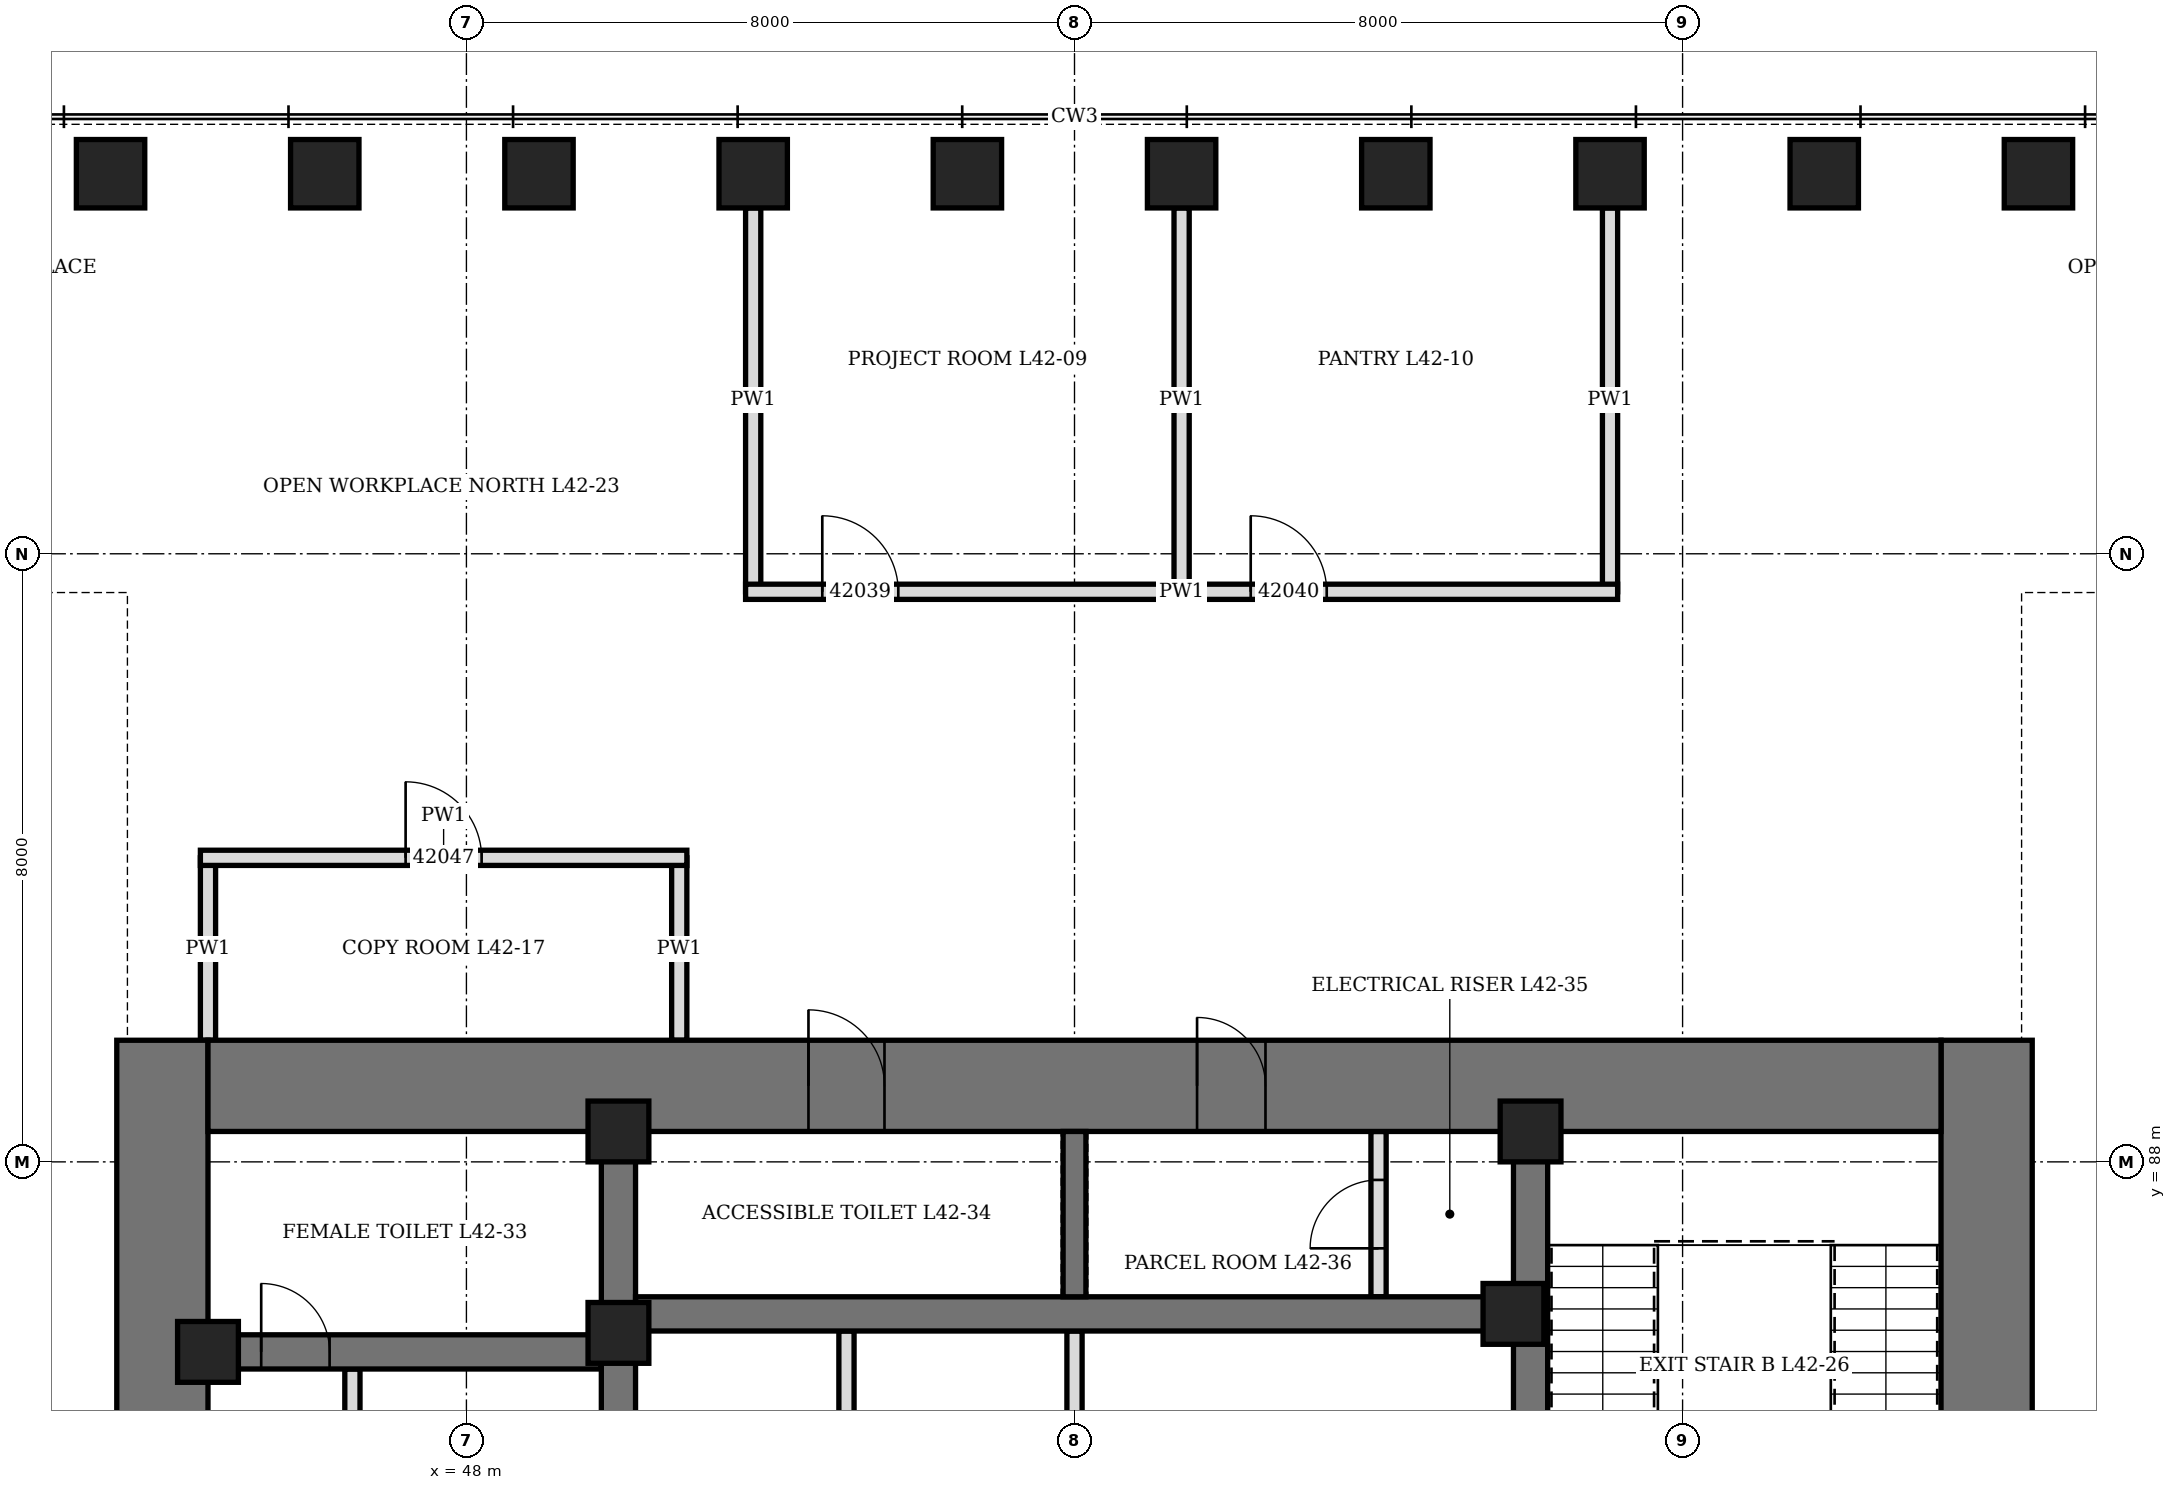
"""IFC4 building model, lengths in metres.
Left out: names, types, materials, properties, quantities, classifications, styles, units other than length and angle.
Written with IfcOpenShell. Run it as: python <this file> out.ifc"""

import sys

from ifc_helpers import new_model, si_unit, direction, frame, frame_2d, origin, origin_2d, place, context, subcontext, project, spatial, rectangle, hollow_rectangle, extrude, element, fill, save


model = new_model("IFC4")
c1 = context("Model", 3, precision=1e-05, world=origin(), true_north=direction((0.0, 1.0)))
c2 = subcontext(c1, "Body", "Model", "MODEL_VIEW")
j1 = project(units=[si_unit("LENGTHUNIT", "METRE"), si_unit("PLANEANGLEUNIT", "RADIAN")], contexts=[c1])
p1 = place(None, origin())
s1 = spatial("IfcSite", under=j1, at=p1, CompositionType="ELEMENT")
p2 = place(p1, origin())
s2 = spatial("IfcBuilding", under=s1, at=p2, CompositionType="ELEMENT")
p3 = place(p2, frame((0.0, 0.0, 189.7)))
s3 = spatial("IfcBuildingStorey", under=s2, at=p3, CompositionType="ELEMENT", Elevation=189.7)
for number, where, z_axis, x_axis in (
    (1, (68.682, 101.0, 0.0), (0.0, 0.0, 1.0), (1.0, 0.0, 0.0)),
    (2, (65.864, 101.0, 0.0), (0.0, 0.0, 1.0), (1.0, 0.0, 0.0)),
    (3, (63.045, 101.0, 0.0), (0.0, 0.0, 1.0), (1.0, 0.0, 0.0)),
    (4, (60.227, 101.0, 0.0), (0.0, 0.0, 1.0), (1.0, 0.0, 0.0)),
    (5, (57.409, 101.0, 0.0), (0.0, 0.0, 1.0), (1.0, 0.0, 0.0)),
    (6, (54.591, 101.0, 0.0), (0.0, 0.0, 1.0), (1.0, 0.0, 0.0)),
    (7, (51.773, 101.0, 0.0), (0.0, 0.0, 1.0), (1.0, 0.0, 0.0)),
    (8, (48.955, 101.0, 0.0), (0.0, 0.0, 1.0), (1.0, 0.0, 0.0)),
    (9, (46.136, 101.0, 0.0), (0.0, 0.0, 1.0), (1.0, 0.0, 0.0)),
    (10, (43.318, 101.0, 0.0), (0.0, 0.0, 1.0), (1.0, 0.0, 0.0)),
):
    element("IfcColumn", number, at=place(p3, frame(where, z_axis=z_axis, x_axis=x_axis)), inside=s3, PredefinedType="COLUMN", context=c2, shape_type="SweptSolid", body=[
        extrude(hollow_rectangle(XDim=0.9, YDim=0.9, WallThickness=0.12, at=origin_2d()), origin(), (0.0, 0.0, 1.0), 4.2),
    ])
p4 = place(p3, frame((44.0, 70.4, 0.0), z_axis=(0.0, 0.0, 1.0), x_axis=(0.0, 1.0, 0.0)))
e11 = element("IfcWall", 11, at=p4, inside=s3, PredefinedType="SHEAR", context=c2, shape_type="SweptSolid", body=[
    extrude(rectangle(XDim=19.2, YDim=1.2, at=frame_2d((9.6, 0.0))), origin(), (0.0, 0.0, 1.0), 4.2),
])
p5 = place(p4, frame((8.6, 0.0, 0.0)))
e12 = element("IfcOpeningElement", 12, at=p5, cuts=e11, PredefinedType="OPENING", context=c2, shape_type="SweptSolid", body=[
    extrude(rectangle(XDim=2.0, YDim=2.4, at=frame_2d((1.0, 1.2))), frame((0.0, 0.61, 0.0), z_axis=(0.0, -1.0, 0.0), x_axis=(1.0, 0.0, 0.0)), (0.0, 0.0, 1.0), 1.22),
])
p6 = place(p3, frame((68.0, 70.4, 0.0), z_axis=(0.0, 0.0, 1.0), x_axis=(0.0, 1.0, 0.0)))
e13 = element("IfcWall", 13, at=p6, inside=s3, PredefinedType="SHEAR", context=c2, shape_type="SweptSolid", body=[
    extrude(rectangle(XDim=19.2, YDim=1.2, at=frame_2d((9.6, 0.0))), origin(), (0.0, 0.0, 1.0), 4.2),
])
p7 = place(p6, frame((8.6, 0.0, 0.0)))
e14 = element("IfcOpeningElement", 14, at=p7, cuts=e13, PredefinedType="OPENING", context=c2, shape_type="SweptSolid", body=[
    extrude(rectangle(XDim=2.0, YDim=2.4, at=frame_2d((1.0, 1.2))), frame((0.0, 0.61, 0.0), z_axis=(0.0, -1.0, 0.0), x_axis=(1.0, 0.0, 0.0)), (0.0, 0.0, 1.0), 1.22),
])
p8 = place(p3, frame((44.6, 89.0, 0.0), z_axis=(0.0, 0.0, 1.0), x_axis=(1.0, 0.0, 0.0)))
e15 = element("IfcWall", 15, at=p8, inside=s3, PredefinedType="SHEAR", context=c2, shape_type="SweptSolid", body=[
    extrude(rectangle(XDim=22.8, YDim=1.2, at=frame_2d((11.4, 0.0))), origin(), (0.0, 0.0, 1.0), 4.2),
])
p9 = place(p8, frame((7.9, 0.0, 0.0)))
e16 = element("IfcOpeningElement", 16, at=p9, cuts=e15, PredefinedType="OPENING", context=c2, shape_type="SweptSolid", body=[
    extrude(rectangle(XDim=1.0, YDim=2.1, at=frame_2d((0.5, 1.05))), frame((0.0, 0.61, 0.0), z_axis=(0.0, -1.0, 0.0), x_axis=(1.0, 0.0, 0.0)), (0.0, 0.0, 1.0), 1.22),
])
p10 = place(p8, frame((13.012, 0.0, 0.0)))
e17 = element("IfcOpeningElement", 17, at=p10, cuts=e15, PredefinedType="OPENING", context=c2, shape_type="SweptSolid", body=[
    extrude(rectangle(XDim=0.9, YDim=2.1, at=frame_2d((0.45, 1.05))), frame((0.0, 0.61, 0.0), z_axis=(0.0, -1.0, 0.0), x_axis=(1.0, 0.0, 0.0)), (0.0, 0.0, 1.0), 1.22),
])
p11 = place(p3, frame((50.0, 71.6, 0.0), z_axis=(0.0, 0.0, 1.0), x_axis=(0.0, 1.0, 0.0)))
e18 = element("IfcWall", 18, at=p11, inside=s3, PredefinedType="SHEAR", context=c2, shape_type="SweptSolid", body=[
    extrude(rectangle(XDim=16.8, YDim=0.45, at=frame_2d((8.4, 0.0))), origin(), (0.0, 0.0, 1.0), 4.2),
])
p12 = place(p11, frame((7.5, 0.0, 0.0)))
e19 = element("IfcOpeningElement", 19, at=p12, cuts=e18, PredefinedType="OPENING", context=c2, shape_type="SweptSolid", body=[
    extrude(rectangle(XDim=1.8, YDim=2.4, at=frame_2d((0.9, 1.2))), frame((0.0, 0.235, 0.0), z_axis=(0.0, -1.0, 0.0), x_axis=(1.0, 0.0, 0.0)), (0.0, 0.0, 1.0), 0.47),
])
p13 = place(p3, frame((62.0, 71.6, 0.0), z_axis=(0.0, 0.0, 1.0), x_axis=(0.0, 1.0, 0.0)))
e20 = element("IfcWall", 20, at=p13, inside=s3, PredefinedType="SHEAR", context=c2, shape_type="SweptSolid", body=[
    extrude(rectangle(XDim=16.8, YDim=0.45, at=frame_2d((8.4, 0.0))), origin(), (0.0, 0.0, 1.0), 4.2),
])
p14 = place(p13, frame((7.5, 0.0, 0.0)))
e21 = element("IfcOpeningElement", 21, at=p14, cuts=e20, PredefinedType="OPENING", context=c2, shape_type="SweptSolid", body=[
    extrude(rectangle(XDim=1.8, YDim=2.4, at=frame_2d((0.9, 1.2))), frame((0.0, 0.235, 0.0), z_axis=(0.0, -1.0, 0.0), x_axis=(1.0, 0.0, 0.0)), (0.0, 0.0, 1.0), 0.47),
])
p15 = place(p3, frame((44.6, 85.5, 0.0), z_axis=(0.0, 0.0, 1.0), x_axis=(1.0, 0.0, 0.0)))
e22 = element("IfcWall", 22, at=p15, inside=s3, PredefinedType="SHEAR", context=c2, shape_type="SweptSolid", body=[
    extrude(rectangle(XDim=5.175, YDim=0.45, at=frame_2d((2.587, 0.0))), origin(), (0.0, 0.0, 1.0), 4.2),
])
p16 = place(p15, frame((0.7, 0.0, 0.0)))
e23 = element("IfcOpeningElement", 23, at=p16, cuts=e22, PredefinedType="OPENING", context=c2, shape_type="SweptSolid", body=[
    extrude(rectangle(XDim=0.9, YDim=2.1, at=frame_2d((0.45, 1.05))), frame((0.0, 0.235, 0.0), z_axis=(0.0, -1.0, 0.0), x_axis=(1.0, 0.0, 0.0)), (0.0, 0.0, 1.0), 0.47),
])
p17 = place(p3, frame((50.225, 86.0, 0.0), z_axis=(0.0, 0.0, 1.0), x_axis=(1.0, 0.0, 0.0)))
e24 = element("IfcWall", 24, at=p17, inside=s3, PredefinedType="SHEAR", context=c2, shape_type="SweptSolid", body=[
    extrude(rectangle(XDim=11.55, YDim=0.45, at=frame_2d((5.775, 0.0))), origin(), (0.0, 0.0, 1.0), 4.2),
])
p18 = place(p3, frame((56.0, 86.225, 0.0), z_axis=(0.0, 0.0, 1.0), x_axis=(0.0, 1.0, 0.0)))
e25 = element("IfcWall", 25, at=p18, inside=s3, PredefinedType="SHEAR", context=c2, shape_type="SweptSolid", body=[
    extrude(rectangle(XDim=2.175, YDim=0.3, at=frame_2d((1.087, 0.0))), origin(), (0.0, 0.0, 1.0), 4.2),
])
for number, where, z_axis, x_axis in (
    (26, (44.6, 85.5, 0.0), (0.0, 0.0, 1.0), (1.0, 0.0, 0.0)),
    (27, (50.0, 85.75, 0.0), (0.0, 0.0, 1.0), (1.0, 0.0, 0.0)),
    (28, (50.0, 88.4, 0.0), (0.0, 0.0, 1.0), (1.0, 0.0, 0.0)),
    (29, (61.775, 86.0, 0.0), (0.0, 0.0, 1.0), (1.0, 0.0, 0.0)),
    (30, (62.0, 88.4, 0.0), (0.0, 0.0, 1.0), (1.0, 0.0, 0.0)),
):
    element("IfcColumn", number, at=place(p3, frame(where, z_axis=z_axis, x_axis=x_axis)), inside=s3, PredefinedType="COLUMN", context=c2, shape_type="SweptSolid", body=[
        extrude(hollow_rectangle(XDim=0.8, YDim=0.8, WallThickness=0.1, at=origin_2d()), origin(), (0.0, 0.0, 1.0), 4.2),
    ])
p19 = place(p3, frame((46.5, 82.225, 0.0), z_axis=(0.0, 0.0, 1.0), x_axis=(0.0, 1.0, 0.0)))
e31 = element("IfcWall", 31, at=p19, inside=s3, PredefinedType="PARTITIONING", context=c2, shape_type="SweptSolid", body=[
    extrude(rectangle(XDim=3.05, YDim=0.2, at=frame_2d((1.525, 0.0))), origin(), (0.0, 0.0, 1.0), 4.04),
])
p20 = place(p19, frame((1.075, 0.0, 0.0)))
e32 = element("IfcOpeningElement", 32, at=p20, cuts=e31, PredefinedType="OPENING", context=c2, shape_type="SweptSolid", body=[
    extrude(rectangle(XDim=0.9, YDim=2.1, at=frame_2d((0.45, 1.05))), frame((0.0, 0.11, 0.0), z_axis=(0.0, -1.0, 0.0), x_axis=(1.0, 0.0, 0.0)), (0.0, 0.0, 1.0), 0.22),
])
p21 = place(p3, frame((60.0, 86.225, 0.0), z_axis=(0.0, 0.0, 1.0), x_axis=(0.0, 1.0, 0.0)))
e33 = element("IfcWall", 33, at=p21, inside=s3, PredefinedType="PARTITIONING", context=c2, shape_type="SweptSolid", body=[
    extrude(rectangle(XDim=2.175, YDim=0.2, at=frame_2d((1.087, 0.0))), origin(), (0.0, 0.0, 1.0), 4.04),
])
p22 = place(p21, frame((0.637, 0.0, 0.0)))
e34 = element("IfcOpeningElement", 34, at=p22, cuts=e33, PredefinedType="OPENING", context=c2, shape_type="SweptSolid", body=[
    extrude(rectangle(XDim=0.9, YDim=2.1, at=frame_2d((0.45, 1.05))), frame((0.0, 0.11, 0.0), z_axis=(0.0, -1.0, 0.0), x_axis=(1.0, 0.0, 0.0)), (0.0, 0.0, 1.0), 0.22),
])
p23 = place(p3, frame((53.0, 82.225, 0.0), z_axis=(0.0, 0.0, 1.0), x_axis=(0.0, 1.0, 0.0)))
e35 = element("IfcWall", 35, at=p23, inside=s3, PredefinedType="PARTITIONING", context=c2, shape_type="SweptSolid", body=[
    extrude(rectangle(XDim=3.55, YDim=0.2, at=frame_2d((1.775, 0.0))), origin(), (0.0, 0.0, 1.0), 4.04),
])
p24 = place(p3, frame((56.0, 82.225, 0.0), z_axis=(0.0, 0.0, 1.0), x_axis=(0.0, 1.0, 0.0)))
e36 = element("IfcWall", 36, at=p24, inside=s3, PredefinedType="PARTITIONING", context=c2, shape_type="SweptSolid", body=[
    extrude(rectangle(XDim=3.55, YDim=0.2, at=frame_2d((1.775, 0.0))), origin(), (0.0, 0.0, 1.0), 2.54),
])
for number, where, z_axis, x_axis in (
    (37, (51.773, 95.5, 0.0), (0.0, 0.0, 1.0), (0.0, 1.0, 0.0)),
    (38, (57.409, 95.5, 0.0), (0.0, 0.0, 1.0), (0.0, 1.0, 0.0)),
    (39, (63.045, 95.5, 0.0), (0.0, 0.0, 1.0), (0.0, 1.0, 0.0)),
):
    element("IfcWall", number, at=place(p3, frame(where, z_axis=z_axis, x_axis=x_axis)), inside=s3, PredefinedType="PARTITIONING", context=c2, shape_type="SweptSolid", body=[
        extrude(rectangle(XDim=5.05, YDim=0.2, at=frame_2d((2.525, 0.0))), origin(), (0.0, 0.0, 1.0), 3.428),
    ])
for number, where, z_axis, x_axis in (
    (40, (44.6, 89.6, 0.0), (0.0, 0.0, 1.0), (0.0, 1.0, 0.0)),
    (41, (50.8, 89.6, 0.0), (0.0, 0.0, 1.0), (0.0, 1.0, 0.0)),
):
    element("IfcWall", number, at=place(p3, frame(where, z_axis=z_axis, x_axis=x_axis)), inside=s3, PredefinedType="PARTITIONING", context=c2, shape_type="SweptSolid", body=[
        extrude(rectangle(XDim=2.4, YDim=0.2, at=frame_2d((1.2, 0.0))), origin(), (0.0, 0.0, 1.0), 4.04),
    ])
p25 = place(p3, frame((44.5, 92.0, 0.0), z_axis=(0.0, 0.0, 1.0), x_axis=(1.0, 0.0, 0.0)))
e42 = element("IfcWall", 42, at=p25, inside=s3, PredefinedType="PARTITIONING", context=c2, shape_type="SweptSolid", body=[
    extrude(rectangle(XDim=6.4, YDim=0.2, at=frame_2d((3.2, 0.0))), origin(), (0.0, 0.0, 1.0), 4.04),
])
p26 = place(p25, frame((2.7, 0.0, 0.0)))
e43 = element("IfcOpeningElement", 43, at=p26, cuts=e42, PredefinedType="OPENING", context=c2, shape_type="SweptSolid", body=[
    extrude(rectangle(XDim=1.0, YDim=2.1, at=frame_2d((0.5, 1.05))), frame((0.0, 0.11, 0.0), z_axis=(0.0, -1.0, 0.0), x_axis=(1.0, 0.0, 0.0)), (0.0, 0.0, 1.0), 0.22),
])
p27 = place(p3, frame((51.673, 95.5, 0.0), z_axis=(0.0, 0.0, 1.0), x_axis=(1.0, 0.0, 0.0)))
e44 = element("IfcWall", 44, at=p27, inside=s3, PredefinedType="PARTITIONING", context=c2, shape_type="SweptSolid", body=[
    extrude(rectangle(XDim=11.473, YDim=0.2, at=frame_2d((5.736, 0.0))), origin(), (0.0, 0.0, 1.0), 4.04),
])
p28 = place(p27, frame((1.009, 0.0, 0.0)))
e45 = element("IfcOpeningElement", 45, at=p28, cuts=e44, PredefinedType="OPENING", context=c2, shape_type="SweptSolid", body=[
    extrude(rectangle(XDim=1.0, YDim=2.1, at=frame_2d((0.5, 1.05))), frame((0.0, 0.11, 0.0), z_axis=(0.0, -1.0, 0.0), x_axis=(1.0, 0.0, 0.0)), (0.0, 0.0, 1.0), 0.22),
])
p29 = place(p27, frame((6.646, 0.0, 0.0)))
e46 = element("IfcOpeningElement", 46, at=p29, cuts=e44, PredefinedType="OPENING", context=c2, shape_type="SweptSolid", body=[
    extrude(rectangle(XDim=1.0, YDim=2.1, at=frame_2d((0.5, 1.05))), frame((0.0, 0.11, 0.0), z_axis=(0.0, -1.0, 0.0), x_axis=(1.0, 0.0, 0.0)), (0.0, 0.0, 1.0), 0.22),
])
p30 = place(p16, origin())
e47 = element("IfcDoor", 47, at=p30, inside=s3, OperationType="SINGLE_SWING_RIGHT", PredefinedType="DOOR", context=c2, shape_type="SweptSolid", body=[
    extrude(rectangle(XDim=0.9, YDim=2.1, at=frame_2d((0.45, 1.05))), frame((0.0, 0.225, 0.0), z_axis=(0.0, -1.0, 0.0), x_axis=(1.0, 0.0, 0.0)), (0.0, 0.0, 1.0), 0.449),
])
fill(e23, e47)
p31 = place(p9, origin())
e48 = element("IfcDoor", 48, at=p31, inside=s3, OperationType="SINGLE_SWING_LEFT", PredefinedType="DOOR", context=c2, shape_type="SweptSolid", body=[
    extrude(rectangle(XDim=1.0, YDim=2.1, at=frame_2d((0.5, 1.05))), frame((0.0, 0.35, 0.0), z_axis=(0.0, -1.0, 0.0), x_axis=(1.0, 0.0, 0.0)), (0.0, 0.0, 1.0), 0.7),
])
fill(e16, e48)
p32 = place(p10, origin())
e49 = element("IfcDoor", 49, at=p32, inside=s3, OperationType="SINGLE_SWING_LEFT", PredefinedType="DOOR", context=c2, shape_type="SweptSolid", body=[
    extrude(rectangle(XDim=0.9, YDim=2.1, at=frame_2d((0.45, 1.05))), frame((0.0, 0.35, 0.0), z_axis=(0.0, -1.0, 0.0), x_axis=(1.0, 0.0, 0.0)), (0.0, 0.0, 1.0), 0.7),
])
fill(e17, e49)
p33 = place(p22, origin())
e50 = element("IfcDoor", 50, at=p33, inside=s3, OperationType="SINGLE_SWING_LEFT", PredefinedType="DOOR", context=c2, shape_type="SweptSolid", body=[
    extrude(rectangle(XDim=0.9, YDim=2.1, at=frame_2d((0.45, 1.05))), frame((0.0, 0.1, 0.0), z_axis=(0.0, -1.0, 0.0), x_axis=(1.0, 0.0, 0.0)), (0.0, 0.0, 1.0), 0.199),
])
fill(e34, e50)
p34 = place(p28, origin())
e51 = element("IfcDoor", 51, at=p34, inside=s3, OperationType="SINGLE_SWING_LEFT", PredefinedType="DOOR", context=c2, shape_type="SweptSolid", body=[
    extrude(rectangle(XDim=1.0, YDim=2.1, at=frame_2d((0.5, 1.05))), frame((0.0, 0.1, 0.0), z_axis=(0.0, -1.0, 0.0), x_axis=(1.0, 0.0, 0.0)), (0.0, 0.0, 1.0), 0.199),
])
fill(e45, e51)
p35 = place(p29, origin())
e52 = element("IfcDoor", 52, at=p35, inside=s3, OperationType="SINGLE_SWING_LEFT", PredefinedType="DOOR", context=c2, shape_type="SweptSolid", body=[
    extrude(rectangle(XDim=1.0, YDim=2.1, at=frame_2d((0.5, 1.05))), frame((0.0, 0.1, 0.0), z_axis=(0.0, -1.0, 0.0), x_axis=(1.0, 0.0, 0.0)), (0.0, 0.0, 1.0), 0.199),
])
fill(e46, e52)
p36 = place(p26, origin())
e53 = element("IfcDoor", 53, at=p36, inside=s3, OperationType="SINGLE_SWING_LEFT", PredefinedType="DOOR", context=c2, shape_type="SweptSolid", body=[
    extrude(rectangle(XDim=1.0, YDim=2.1, at=frame_2d((0.5, 1.05))), frame((0.0, 0.1, 0.0), z_axis=(0.0, -1.0, 0.0), x_axis=(1.0, 0.0, 0.0)), (0.0, 0.0, 1.0), 0.199),
])
fill(e43, e53)
save(model, sys.argv[1])
